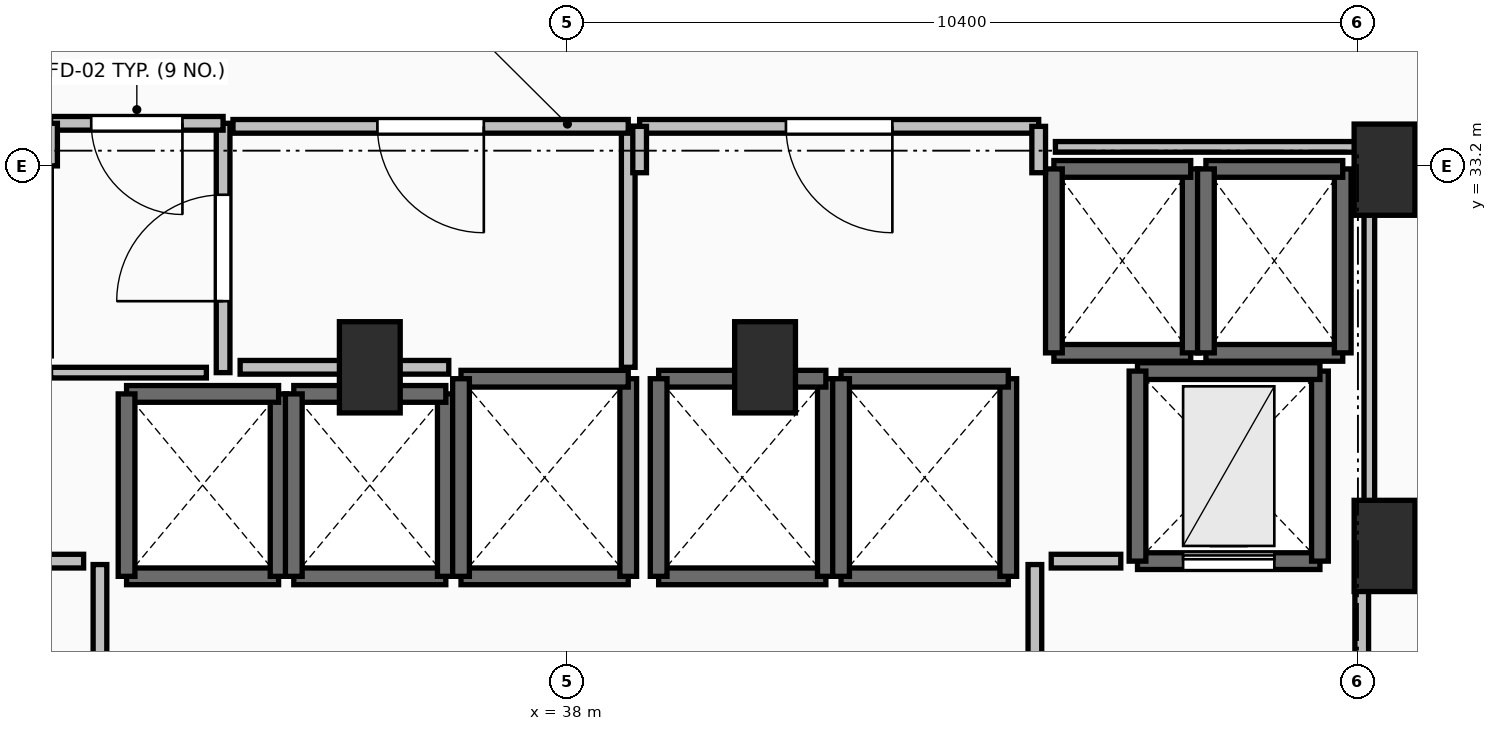
"""IFC4 building model, lengths in metres.
Left out: names, types, materials, properties, quantities, classifications, styles, units other than length and angle.
Written with IfcOpenShell. Run it as: python <this file> out.ifc"""

import sys

from ifc_helpers import new_model, si_unit, direction, frame, frame_2d, origin, origin_2d, place, context, subcontext, project, spatial, rectangle, extrude, element, fill, save


model = new_model("IFC4")
c1 = context("Model", 3, precision=1e-05, world=origin(), true_north=direction((0.0, 1.0)))
c2 = subcontext(c1, "Body", "Model", "MODEL_VIEW")
j1 = project(units=[si_unit("LENGTHUNIT", "METRE"), si_unit("PLANEANGLEUNIT", "RADIAN")], contexts=[c1])
p1 = place(None, origin())
s1 = spatial("IfcSite", under=j1, at=p1, CompositionType="ELEMENT")
p2 = place(p1, origin())
s2 = spatial("IfcBuilding", under=s1, at=p2, CompositionType="ELEMENT")
p3 = place(p2, frame((0.0, 0.0, 124.3)))
s3 = spatial("IfcBuildingStorey", under=s2, at=p3, CompositionType="ELEMENT", Elevation=124.3)
for number, where, z_axis, x_axis in (
    (1, (48.75, 33.15, 0.0), (0.0, 0.0, 1.0), (1.0, 0.0, 0.0)),
    (2, (48.75, 28.2, 0.0), (0.0, 0.0, 1.0), (1.0, 0.0, 0.0)),
    (3, (35.4, 30.55, 0.0), (0.0, 0.0, 1.0), (1.0, 0.0, 0.0)),
    (4, (40.6, 30.55, 0.0), (0.0, 0.0, 1.0), (1.0, 0.0, 0.0)),
):
    element("IfcColumn", number, at=place(p3, frame(where, z_axis=z_axis, x_axis=x_axis)), inside=s3, PredefinedType="PILASTER", context=c2, shape_type="SweptSolid", body=[
        extrude(rectangle(XDim=0.8, YDim=1.2, at=origin_2d()), origin(), (0.0, 0.0, 1.0), 4.8),
    ])
p4 = place(p3, frame((32.2, 27.8, 0.0), z_axis=(0.0, 0.0, 1.0), x_axis=(1.0, 0.0, 0.0)))
e5 = element("IfcWall", 5, at=p4, inside=s3, PredefinedType="SOLIDWALL", context=c2, shape_type="SweptSolid", body=[
    extrude(rectangle(XDim=2.0, YDim=0.22, at=frame_2d((1.0, 0.0))), origin(), (0.0, 0.0, 1.0), 4.54),
])
p5 = place(p3, frame((34.2, 27.8, 0.0), z_axis=(0.0, 0.0, 1.0), x_axis=(0.0, 1.0, 0.0)))
e6 = element("IfcWall", 6, at=p5, inside=s3, PredefinedType="SOLIDWALL", context=c2, shape_type="SweptSolid", body=[
    extrude(rectangle(XDim=2.4, YDim=0.22, at=frame_2d((1.2, 0.0))), origin(), (0.0, 0.0, 1.0), 4.54),
])
p6 = place(p3, frame((34.2, 30.2, 0.0), z_axis=(0.0, 0.0, 1.0), x_axis=(-1.0, 0.0, 0.0)))
e7 = element("IfcWall", 7, at=p6, inside=s3, PredefinedType="SOLIDWALL", context=c2, shape_type="SweptSolid", body=[
    extrude(rectangle(XDim=2.0, YDim=0.22, at=frame_2d((1.0, 0.0))), origin(), (0.0, 0.0, 1.0), 4.54),
])
p7 = place(p3, frame((32.2, 30.2, 0.0), z_axis=(0.0, 0.0, 1.0), x_axis=(0.0, -1.0, 0.0)))
e8 = element("IfcWall", 8, at=p7, inside=s3, PredefinedType="SOLIDWALL", context=c2, shape_type="SweptSolid", body=[
    extrude(rectangle(XDim=2.4, YDim=0.22, at=frame_2d((1.2, 0.0))), origin(), (0.0, 0.0, 1.0), 4.54),
])
p8 = place(p3, frame((34.4, 27.8, 0.0), z_axis=(0.0, 0.0, 1.0), x_axis=(1.0, 0.0, 0.0)))
e9 = element("IfcWall", 9, at=p8, inside=s3, PredefinedType="SOLIDWALL", context=c2, shape_type="SweptSolid", body=[
    extrude(rectangle(XDim=2.0, YDim=0.22, at=frame_2d((1.0, 0.0))), origin(), (0.0, 0.0, 1.0), 4.54),
])
p9 = place(p3, frame((36.4, 27.8, 0.0), z_axis=(0.0, 0.0, 1.0), x_axis=(0.0, 1.0, 0.0)))
e10 = element("IfcWall", 10, at=p9, inside=s3, PredefinedType="SOLIDWALL", context=c2, shape_type="SweptSolid", body=[
    extrude(rectangle(XDim=2.4, YDim=0.22, at=frame_2d((1.2, 0.0))), origin(), (0.0, 0.0, 1.0), 4.54),
])
p10 = place(p3, frame((36.4, 30.2, 0.0), z_axis=(0.0, 0.0, 1.0), x_axis=(-1.0, 0.0, 0.0)))
e11 = element("IfcWall", 11, at=p10, inside=s3, PredefinedType="SOLIDWALL", context=c2, shape_type="SweptSolid", body=[
    extrude(rectangle(XDim=2.0, YDim=0.22, at=frame_2d((1.0, 0.0))), origin(), (0.0, 0.0, 1.0), 4.54),
])
p11 = place(p3, frame((34.4, 30.2, 0.0), z_axis=(0.0, 0.0, 1.0), x_axis=(0.0, -1.0, 0.0)))
e12 = element("IfcWall", 12, at=p11, inside=s3, PredefinedType="SOLIDWALL", context=c2, shape_type="SweptSolid", body=[
    extrude(rectangle(XDim=2.4, YDim=0.22, at=frame_2d((1.2, 0.0))), origin(), (0.0, 0.0, 1.0), 4.54),
])
p12 = place(p3, frame((36.6, 27.8, 0.0), z_axis=(0.0, 0.0, 1.0), x_axis=(1.0, 0.0, 0.0)))
e13 = element("IfcWall", 13, at=p12, inside=s3, PredefinedType="SOLIDWALL", context=c2, shape_type="SweptSolid", body=[
    extrude(rectangle(XDim=2.2, YDim=0.22, at=frame_2d((1.1, 0.0))), origin(), (0.0, 0.0, 1.0), 4.54),
])
p13 = place(p3, frame((38.8, 27.8, 0.0), z_axis=(0.0, 0.0, 1.0), x_axis=(0.0, 1.0, 0.0)))
e14 = element("IfcWall", 14, at=p13, inside=s3, PredefinedType="SOLIDWALL", context=c2, shape_type="SweptSolid", body=[
    extrude(rectangle(XDim=2.6, YDim=0.22, at=frame_2d((1.3, 0.0))), origin(), (0.0, 0.0, 1.0), 4.54),
])
p14 = place(p3, frame((38.8, 30.4, 0.0), z_axis=(0.0, 0.0, 1.0), x_axis=(-1.0, 0.0, 0.0)))
e15 = element("IfcWall", 15, at=p14, inside=s3, PredefinedType="SOLIDWALL", context=c2, shape_type="SweptSolid", body=[
    extrude(rectangle(XDim=2.2, YDim=0.22, at=frame_2d((1.1, 0.0))), origin(), (0.0, 0.0, 1.0), 4.54),
])
p15 = place(p3, frame((36.6, 30.4, 0.0), z_axis=(0.0, 0.0, 1.0), x_axis=(0.0, -1.0, 0.0)))
e16 = element("IfcWall", 16, at=p15, inside=s3, PredefinedType="SOLIDWALL", context=c2, shape_type="SweptSolid", body=[
    extrude(rectangle(XDim=2.6, YDim=0.22, at=frame_2d((1.3, 0.0))), origin(), (0.0, 0.0, 1.0), 4.54),
])
p16 = place(p3, frame((39.2, 27.8, 0.0), z_axis=(0.0, 0.0, 1.0), x_axis=(1.0, 0.0, 0.0)))
e17 = element("IfcWall", 17, at=p16, inside=s3, PredefinedType="SOLIDWALL", context=c2, shape_type="SweptSolid", body=[
    extrude(rectangle(XDim=2.2, YDim=0.22, at=frame_2d((1.1, 0.0))), origin(), (0.0, 0.0, 1.0), 4.54),
])
p17 = place(p3, frame((41.4, 27.8, 0.0), z_axis=(0.0, 0.0, 1.0), x_axis=(0.0, 1.0, 0.0)))
e18 = element("IfcWall", 18, at=p17, inside=s3, PredefinedType="SOLIDWALL", context=c2, shape_type="SweptSolid", body=[
    extrude(rectangle(XDim=2.6, YDim=0.22, at=frame_2d((1.3, 0.0))), origin(), (0.0, 0.0, 1.0), 4.54),
])
p18 = place(p3, frame((41.4, 30.4, 0.0), z_axis=(0.0, 0.0, 1.0), x_axis=(-1.0, 0.0, 0.0)))
e19 = element("IfcWall", 19, at=p18, inside=s3, PredefinedType="SOLIDWALL", context=c2, shape_type="SweptSolid", body=[
    extrude(rectangle(XDim=2.2, YDim=0.22, at=frame_2d((1.1, 0.0))), origin(), (0.0, 0.0, 1.0), 4.54),
])
p19 = place(p3, frame((39.2, 30.4, 0.0), z_axis=(0.0, 0.0, 1.0), x_axis=(0.0, -1.0, 0.0)))
e20 = element("IfcWall", 20, at=p19, inside=s3, PredefinedType="SOLIDWALL", context=c2, shape_type="SweptSolid", body=[
    extrude(rectangle(XDim=2.6, YDim=0.22, at=frame_2d((1.3, 0.0))), origin(), (0.0, 0.0, 1.0), 4.54),
])
p20 = place(p3, frame((41.6, 27.8, 0.0), z_axis=(0.0, 0.0, 1.0), x_axis=(1.0, 0.0, 0.0)))
e21 = element("IfcWall", 21, at=p20, inside=s3, PredefinedType="SOLIDWALL", context=c2, shape_type="SweptSolid", body=[
    extrude(rectangle(XDim=2.2, YDim=0.22, at=frame_2d((1.1, 0.0))), origin(), (0.0, 0.0, 1.0), 4.54),
])
p21 = place(p3, frame((43.8, 27.8, 0.0), z_axis=(0.0, 0.0, 1.0), x_axis=(0.0, 1.0, 0.0)))
e22 = element("IfcWall", 22, at=p21, inside=s3, PredefinedType="SOLIDWALL", context=c2, shape_type="SweptSolid", body=[
    extrude(rectangle(XDim=2.6, YDim=0.22, at=frame_2d((1.3, 0.0))), origin(), (0.0, 0.0, 1.0), 4.54),
])
p22 = place(p3, frame((43.8, 30.4, 0.0), z_axis=(0.0, 0.0, 1.0), x_axis=(-1.0, 0.0, 0.0)))
e23 = element("IfcWall", 23, at=p22, inside=s3, PredefinedType="SOLIDWALL", context=c2, shape_type="SweptSolid", body=[
    extrude(rectangle(XDim=2.2, YDim=0.22, at=frame_2d((1.1, 0.0))), origin(), (0.0, 0.0, 1.0), 4.54),
])
p23 = place(p3, frame((41.6, 30.4, 0.0), z_axis=(0.0, 0.0, 1.0), x_axis=(0.0, -1.0, 0.0)))
e24 = element("IfcWall", 24, at=p23, inside=s3, PredefinedType="SOLIDWALL", context=c2, shape_type="SweptSolid", body=[
    extrude(rectangle(XDim=2.6, YDim=0.22, at=frame_2d((1.3, 0.0))), origin(), (0.0, 0.0, 1.0), 4.54),
])
p24 = place(p3, frame((44.4, 30.74, 0.0), z_axis=(0.0, 0.0, 1.0), x_axis=(1.0, 0.0, 0.0)))
e25 = element("IfcWall", 25, at=p24, inside=s3, PredefinedType="SOLIDWALL", context=c2, shape_type="SweptSolid", body=[
    extrude(rectangle(XDim=1.8, YDim=0.22, at=frame_2d((0.9, 0.0))), origin(), (0.0, 0.0, 1.0), 4.54),
])
p25 = place(p3, frame((46.2, 30.74, 0.0), z_axis=(0.0, 0.0, 1.0), x_axis=(0.0, 1.0, 0.0)))
e26 = element("IfcWall", 26, at=p25, inside=s3, PredefinedType="SOLIDWALL", context=c2, shape_type="SweptSolid", body=[
    extrude(rectangle(XDim=2.42, YDim=0.22, at=frame_2d((1.21, 0.0))), origin(), (0.0, 0.0, 1.0), 4.54),
])
p26 = place(p3, frame((46.2, 33.16, 0.0), z_axis=(0.0, 0.0, 1.0), x_axis=(-1.0, 0.0, 0.0)))
e27 = element("IfcWall", 27, at=p26, inside=s3, PredefinedType="SOLIDWALL", context=c2, shape_type="SweptSolid", body=[
    extrude(rectangle(XDim=1.8, YDim=0.22, at=frame_2d((0.9, 0.0))), origin(), (0.0, 0.0, 1.0), 4.54),
])
p27 = place(p3, frame((44.4, 33.16, 0.0), z_axis=(0.0, 0.0, 1.0), x_axis=(0.0, -1.0, 0.0)))
e28 = element("IfcWall", 28, at=p27, inside=s3, PredefinedType="SOLIDWALL", context=c2, shape_type="SweptSolid", body=[
    extrude(rectangle(XDim=2.42, YDim=0.22, at=frame_2d((1.21, 0.0))), origin(), (0.0, 0.0, 1.0), 4.54),
])
p28 = place(p3, frame((46.4, 30.74, 0.0), z_axis=(0.0, 0.0, 1.0), x_axis=(1.0, 0.0, 0.0)))
e29 = element("IfcWall", 29, at=p28, inside=s3, PredefinedType="SOLIDWALL", context=c2, shape_type="SweptSolid", body=[
    extrude(rectangle(XDim=1.8, YDim=0.22, at=frame_2d((0.9, 0.0))), origin(), (0.0, 0.0, 1.0), 4.54),
])
p29 = place(p3, frame((48.2, 30.74, 0.0), z_axis=(0.0, 0.0, 1.0), x_axis=(0.0, 1.0, 0.0)))
e30 = element("IfcWall", 30, at=p29, inside=s3, PredefinedType="SOLIDWALL", context=c2, shape_type="SweptSolid", body=[
    extrude(rectangle(XDim=2.42, YDim=0.22, at=frame_2d((1.21, 0.0))), origin(), (0.0, 0.0, 1.0), 4.54),
])
p30 = place(p3, frame((48.2, 33.16, 0.0), z_axis=(0.0, 0.0, 1.0), x_axis=(-1.0, 0.0, 0.0)))
e31 = element("IfcWall", 31, at=p30, inside=s3, PredefinedType="SOLIDWALL", context=c2, shape_type="SweptSolid", body=[
    extrude(rectangle(XDim=1.8, YDim=0.22, at=frame_2d((0.9, 0.0))), origin(), (0.0, 0.0, 1.0), 4.54),
])
p31 = place(p3, frame((46.4, 33.16, 0.0), z_axis=(0.0, 0.0, 1.0), x_axis=(0.0, -1.0, 0.0)))
e32 = element("IfcWall", 32, at=p31, inside=s3, PredefinedType="SOLIDWALL", context=c2, shape_type="SweptSolid", body=[
    extrude(rectangle(XDim=2.42, YDim=0.22, at=frame_2d((1.21, 0.0))), origin(), (0.0, 0.0, 1.0), 4.54),
])
p32 = place(p3, frame((45.5, 28.0, 0.0), z_axis=(0.0, 0.0, 1.0), x_axis=(1.0, 0.0, 0.0)))
e33 = element("IfcWall", 33, at=p32, inside=s3, PredefinedType="SHEAR", context=c2, shape_type="SweptSolid", body=[
    extrude(rectangle(XDim=2.4, YDim=0.22, at=frame_2d((1.2, 0.0))), origin(), (0.0, 0.0, 1.0), 4.54),
])
p33 = place(p32, frame((0.6, 0.0, 0.0)))
e34 = element("IfcOpeningElement", 34, at=p33, cuts=e33, PredefinedType="OPENING", context=c2, shape_type="SweptSolid", body=[
    extrude(rectangle(XDim=1.2, YDim=2.2, at=frame_2d((0.6, 1.1))), frame((0.0, 0.125, 0.0), z_axis=(0.0, -1.0, 0.0), x_axis=(1.0, 0.0, 0.0)), (0.0, 0.0, 1.0), 0.25),
])
p34 = place(p3, frame((47.9, 28.0, 0.0), z_axis=(0.0, 0.0, 1.0), x_axis=(0.0, 1.0, 0.0)))
e35 = element("IfcWall", 35, at=p34, inside=s3, PredefinedType="SHEAR", context=c2, shape_type="SweptSolid", body=[
    extrude(rectangle(XDim=2.5, YDim=0.22, at=frame_2d((1.25, 0.0))), origin(), (0.0, 0.0, 1.0), 4.54),
])
p35 = place(p3, frame((47.9, 30.5, 0.0), z_axis=(0.0, 0.0, 1.0), x_axis=(-1.0, 0.0, 0.0)))
e36 = element("IfcWall", 36, at=p35, inside=s3, PredefinedType="SHEAR", context=c2, shape_type="SweptSolid", body=[
    extrude(rectangle(XDim=2.4, YDim=0.22, at=frame_2d((1.2, 0.0))), origin(), (0.0, 0.0, 1.0), 4.54),
])
p36 = place(p3, frame((45.5, 30.5, 0.0), z_axis=(0.0, 0.0, 1.0), x_axis=(0.0, -1.0, 0.0)))
e37 = element("IfcWall", 37, at=p36, inside=s3, PredefinedType="SHEAR", context=c2, shape_type="SweptSolid", body=[
    extrude(rectangle(XDim=2.5, YDim=0.22, at=frame_2d((1.25, 0.0))), origin(), (0.0, 0.0, 1.0), 4.54),
])
p37 = place(p3, frame((31.85, 24.045, 0.0), z_axis=(0.0, 0.0, 1.0), x_axis=(0.0, 1.0, 0.0)))
e38 = element("IfcWall", 38, at=p37, inside=s3, PredefinedType="PARTITIONING", context=c2, shape_type="SweptSolid", body=[
    extrude(rectangle(XDim=3.91, YDim=0.18, at=frame_2d((1.955, 0.0))), origin(), (0.0, 0.0, 1.0), 4.54),
])
p38 = place(p37, frame((1.355, 0.0, 0.0)))
e39 = element("IfcOpeningElement", 39, at=p38, cuts=e38, PredefinedType="OPENING", context=c2, shape_type="SweptSolid", body=[
    extrude(rectangle(XDim=1.2, YDim=2.15, at=frame_2d((0.6, 1.075))), frame((0.0, 0.105, 0.0), z_axis=(0.0, -1.0, 0.0), x_axis=(1.0, 0.0, 0.0)), (0.0, 0.0, 1.0), 0.21),
])
p39 = place(p3, frame((44.15, 27.955, 0.0), z_axis=(0.0, 0.0, 1.0), x_axis=(0.0, -1.0, 0.0)))
e40 = element("IfcWall", 40, at=p39, inside=s3, PredefinedType="PARTITIONING", context=c2, shape_type="SweptSolid", body=[
    extrude(rectangle(XDim=3.91, YDim=0.18, at=frame_2d((1.955, 0.0))), origin(), (0.0, 0.0, 1.0), 4.54),
])
p40 = place(p39, frame((1.355, 0.0, 0.0)))
e41 = element("IfcOpeningElement", 41, at=p40, cuts=e40, PredefinedType="OPENING", context=c2, shape_type="SweptSolid", body=[
    extrude(rectangle(XDim=1.2, YDim=2.15, at=frame_2d((0.6, 1.075))), frame((0.0, 0.105, 0.0), z_axis=(0.0, -1.0, 0.0), x_axis=(1.0, 0.0, 0.0)), (0.0, 0.0, 1.0), 0.21),
])
p41 = place(p3, frame((48.45, 23.95, 0.0), z_axis=(0.0, 0.0, 1.0), x_axis=(0.0, 1.0, 0.0)))
e42 = element("IfcWall", 42, at=p41, inside=s3, PredefinedType="PARTITIONING", context=c2, shape_type="SweptSolid", body=[
    extrude(rectangle(XDim=4.05, YDim=0.18, at=frame_2d((2.025, 0.0))), origin(), (0.0, 0.0, 1.0), 3.522),
])
p42 = place(p41, frame((1.425, 0.0, 0.0)))
e43 = element("IfcOpeningElement", 43, at=p42, cuts=e42, PredefinedType="OPENING", context=c2, shape_type="SweptSolid", body=[
    extrude(rectangle(XDim=1.2, YDim=2.15, at=frame_2d((0.6, 1.075))), frame((0.0, 0.105, 0.0), z_axis=(0.0, -1.0, 0.0), x_axis=(1.0, 0.0, 0.0)), (0.0, 0.0, 1.0), 0.21),
])
p43 = place(p3, frame((33.47, 30.48, 0.0), z_axis=(0.0, 0.0, 1.0), x_axis=(0.0, 1.0, 0.0)))
e44 = element("IfcWall", 44, at=p43, inside=s3, PredefinedType="PARTITIONING", context=c2, shape_type="SweptSolid", body=[
    extrude(rectangle(XDim=3.28, YDim=0.18, at=frame_2d((1.64, 0.0))), origin(), (0.0, 0.0, 1.0), 4.54),
])
p44 = place(p43, frame((0.94, 0.0, 0.0)))
e45 = element("IfcOpeningElement", 45, at=p44, cuts=e44, PredefinedType="OPENING", context=c2, shape_type="SweptSolid", body=[
    extrude(rectangle(XDim=1.4, YDim=2.2, at=frame_2d((0.7, 1.1))), frame((0.0, 0.105, 0.0), z_axis=(0.0, -1.0, 0.0), x_axis=(1.0, 0.0, 0.0)), (0.0, 0.0, 1.0), 0.21),
])
p45 = place(p3, frame((33.47, 33.76, 0.0), z_axis=(0.0, 0.0, 1.0), x_axis=(-1.0, 0.0, 0.0)))
e46 = element("IfcWall", 46, at=p45, inside=s3, PredefinedType="PARTITIONING", context=c2, shape_type="SweptSolid", body=[
    extrude(rectangle(XDim=2.27, YDim=0.18, at=frame_2d((1.135, 0.0))), origin(), (0.0, 0.0, 1.0), 4.54),
])
p46 = place(p45, frame((0.535, 0.0, 0.0)))
e47 = element("IfcOpeningElement", 47, at=p46, cuts=e46, PredefinedType="OPENING", context=c2, shape_type="SweptSolid", body=[
    extrude(rectangle(XDim=1.2, YDim=2.15, at=frame_2d((0.6, 1.075))), frame((0.0, 0.105, 0.0), z_axis=(0.0, -1.0, 0.0), x_axis=(1.0, 0.0, 0.0)), (0.0, 0.0, 1.0), 0.21),
])
p47 = place(p3, frame((31.2, 33.76, 0.0), z_axis=(0.0, 0.0, 1.0), x_axis=(0.0, -1.0, 0.0)))
e48 = element("IfcWall", 48, at=p47, inside=s3, PredefinedType="PARTITIONING", context=c2, shape_type="SweptSolid", body=[
    extrude(rectangle(XDim=0.56, YDim=0.18, at=frame_2d((0.28, 0.0))), origin(), (0.0, 0.0, 1.0), 4.54),
])
p48 = place(p3, frame((38.8, 30.55, 0.0), z_axis=(0.0, 0.0, 1.0), x_axis=(0.0, 1.0, 0.0)))
e49 = element("IfcWall", 49, at=p48, inside=s3, PredefinedType="PARTITIONING", context=c2, shape_type="SweptSolid", body=[
    extrude(rectangle(XDim=3.17, YDim=0.18, at=frame_2d((1.585, 0.0))), origin(), (0.0, 0.0, 1.0), 3.522),
])
p49 = place(p3, frame((38.8, 33.72, 0.0), z_axis=(0.0, 0.0, 1.0), x_axis=(-1.0, 0.0, 0.0)))
e50 = element("IfcWall", 50, at=p49, inside=s3, PredefinedType="PARTITIONING", context=c2, shape_type="SweptSolid", body=[
    extrude(rectangle(XDim=5.2, YDim=0.18, at=frame_2d((2.6, 0.0))), origin(), (0.0, 0.0, 1.0), 4.54),
])
p50 = place(p49, frame((1.9, 0.0, 0.0)))
e51 = element("IfcOpeningElement", 51, at=p50, cuts=e50, PredefinedType="OPENING", context=c2, shape_type="SweptSolid", body=[
    extrude(rectangle(XDim=1.4, YDim=2.2, at=frame_2d((0.7, 1.1))), frame((0.0, 0.105, 0.0), z_axis=(0.0, -1.0, 0.0), x_axis=(1.0, 0.0, 0.0)), (0.0, 0.0, 1.0), 0.21),
])
p51 = place(p3, frame((44.2, 33.72, 0.0), z_axis=(0.0, 0.0, 1.0), x_axis=(-1.0, 0.0, 0.0)))
e52 = element("IfcWall", 52, at=p51, inside=s3, PredefinedType="PARTITIONING", context=c2, shape_type="SweptSolid", body=[
    extrude(rectangle(XDim=5.25, YDim=0.18, at=frame_2d((2.625, 0.0))), origin(), (0.0, 0.0, 1.0), 4.54),
])
p52 = place(p51, frame((1.925, 0.0, 0.0)))
e53 = element("IfcOpeningElement", 53, at=p52, cuts=e52, PredefinedType="OPENING", context=c2, shape_type="SweptSolid", body=[
    extrude(rectangle(XDim=1.4, YDim=2.2, at=frame_2d((0.7, 1.1))), frame((0.0, 0.105, 0.0), z_axis=(0.0, -1.0, 0.0), x_axis=(1.0, 0.0, 0.0)), (0.0, 0.0, 1.0), 0.21),
])
for number, where, z_axis, x_axis in (
    (54, (38.95, 33.72, 0.0), (0.0, 0.0, 1.0), (0.0, -1.0, 0.0)),
    (55, (44.2, 33.11, 0.0), (0.0, 0.0, 1.0), (0.0, 1.0, 0.0)),
):
    element("IfcWall", number, at=place(p3, frame(where, z_axis=z_axis, x_axis=x_axis)), inside=s3, PredefinedType="PARTITIONING", context=c2, shape_type="SweptSolid", body=[
        extrude(rectangle(XDim=0.61, YDim=0.18, at=frame_2d((0.305, 0.0))), origin(), (0.0, 0.0, 1.0), 4.54),
    ])
for number, where, z_axis, x_axis in (
    (56, (31.635, 28.0, 0.0), (0.0, 0.0, 1.0), (-1.0, 0.0, 0.0)),
    (57, (45.28, 28.0, 0.0), (0.0, 0.0, 1.0), (-1.0, 0.0, 0.0)),
):
    element("IfcWall", number, at=place(p3, frame(where, z_axis=z_axis, x_axis=x_axis)), inside=s3, PredefinedType="PARTITIONING", context=c2, shape_type="SweptSolid", body=[
        extrude(rectangle(XDim=0.915, YDim=0.18, at=frame_2d((0.458, 0.0))), origin(), (0.0, 0.0, 1.0), 4.54),
    ])
p53 = place(p3, frame((31.2, 30.48, 0.0), z_axis=(0.0, 0.0, 1.0), x_axis=(1.0, 0.0, 0.0)))
e58 = element("IfcWall", 58, at=p53, inside=s3, PredefinedType="PARTITIONING", context=c2, shape_type="SweptSolid", body=[
    extrude(rectangle(XDim=2.05, YDim=0.14, at=frame_2d((1.025, 0.0))), origin(), (0.0, 0.0, 1.0), 4.54),
])
p54 = place(p3, frame((33.694, 30.55, 0.0), z_axis=(0.0, 0.0, 1.0), x_axis=(1.0, 0.0, 0.0)))
e59 = element("IfcWall", 59, at=p54, inside=s3, PredefinedType="PARTITIONING", context=c2, shape_type="SweptSolid", body=[
    extrude(rectangle(XDim=2.745, YDim=0.18, at=frame_2d((1.373, 0.0))), origin(), (0.0, 0.0, 1.0), 3.522),
])
p55 = place(p3, frame((48.55, 28.196, 0.0), z_axis=(0.0, 0.0, 1.0), x_axis=(0.0, 1.0, 0.0)))
e60 = element("IfcWall", 60, at=p55, inside=s3, PredefinedType="PARTITIONING", context=c2, shape_type="SweptSolid", body=[
    extrude(rectangle(XDim=5.254, YDim=0.14, at=frame_2d((2.627, 0.0))), origin(), (0.0, 0.0, 1.0), 3.522),
])
p56 = place(p3, frame((48.55, 33.45, 0.0), z_axis=(0.0, 0.0, 1.0), x_axis=(-1.0, 0.0, 0.0)))
e61 = element("IfcWall", 61, at=p56, inside=s3, PredefinedType="PARTITIONING", context=c2, shape_type="SweptSolid", body=[
    extrude(rectangle(XDim=4.13, YDim=0.14, at=frame_2d((2.065, 0.0))), origin(), (0.0, 0.0, 1.0), 3.522),
])
p57 = place(p33, origin())
e62 = element("IfcDoor", 62, at=p57, inside=s3, OperationType="SLIDING_TO_LEFT", PredefinedType="DOOR", context=c2, shape_type="SweptSolid", body=[
    extrude(rectangle(XDim=1.2, YDim=2.2, at=frame_2d((0.6, 1.1))), frame((0.0, 0.025, 0.0), z_axis=(0.0, -1.0, 0.0), x_axis=(1.0, 0.0, 0.0)), (0.0, 0.0, 1.0), 0.05),
])
fill(e34, e62)
p58 = place(p44, origin())
e63 = element("IfcDoor", 63, at=p58, inside=s3, OperationType="DOUBLE_SWING_LEFT", PredefinedType="DOOR", context=c2, shape_type="SweptSolid", body=[
    extrude(rectangle(XDim=1.4, YDim=2.2, at=frame_2d((0.7, 1.1))), frame((0.0, 0.025, 0.0), z_axis=(0.0, -1.0, 0.0), x_axis=(1.0, 0.0, 0.0)), (0.0, 0.0, 1.0), 0.05),
])
fill(e45, e63)
p59 = place(p46, origin())
e64 = element("IfcDoor", 64, at=p59, inside=s3, OperationType="SINGLE_SWING_LEFT", PredefinedType="DOOR", context=c2, shape_type="SweptSolid", body=[
    extrude(rectangle(XDim=1.2, YDim=2.15, at=frame_2d((0.6, 1.075))), frame((0.0, 0.025, 0.0), z_axis=(0.0, -1.0, 0.0), x_axis=(1.0, 0.0, 0.0)), (0.0, 0.0, 1.0), 0.05),
])
fill(e47, e64)
p60 = place(p50, origin())
e65 = element("IfcDoor", 65, at=p60, inside=s3, OperationType="DOUBLE_SWING_LEFT", PredefinedType="DOOR", context=c2, shape_type="SweptSolid", body=[
    extrude(rectangle(XDim=1.4, YDim=2.2, at=frame_2d((0.7, 1.1))), frame((0.0, 0.025, 0.0), z_axis=(0.0, -1.0, 0.0), x_axis=(1.0, 0.0, 0.0)), (0.0, 0.0, 1.0), 0.05),
])
fill(e51, e65)
p61 = place(p52, origin())
e66 = element("IfcDoor", 66, at=p61, inside=s3, OperationType="DOUBLE_SWING_LEFT", PredefinedType="DOOR", context=c2, shape_type="SweptSolid", body=[
    extrude(rectangle(XDim=1.4, YDim=2.2, at=frame_2d((0.7, 1.1))), frame((0.0, 0.025, 0.0), z_axis=(0.0, -1.0, 0.0), x_axis=(1.0, 0.0, 0.0)), (0.0, 0.0, 1.0), 0.05),
])
fill(e53, e66)
save(model, sys.argv[1])
